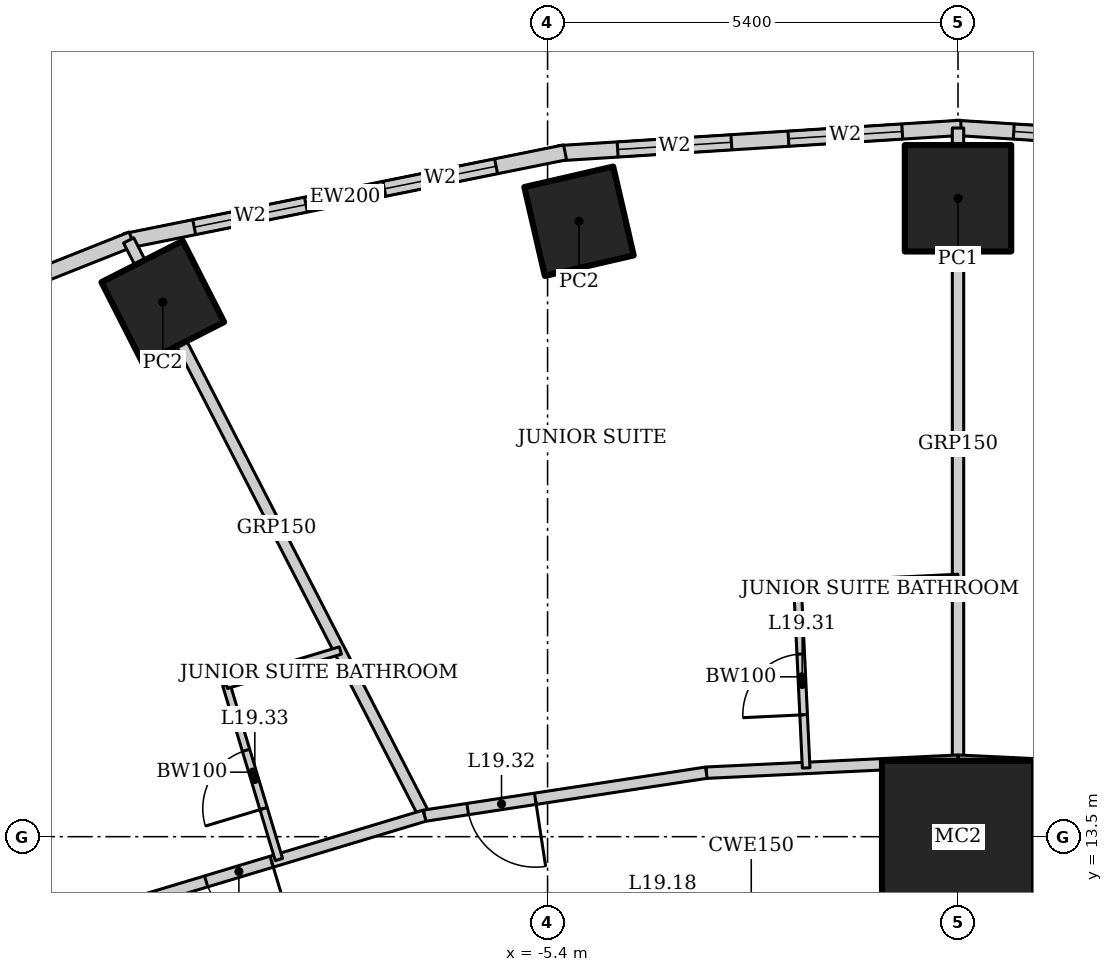
"""IFC4 building model, lengths in metres.
Left out: names, types, materials, properties, quantities, classifications, styles, units other than length and angle.
Written with IfcOpenShell. Run it as: python <this file> out.ifc"""

import sys

from ifc_helpers import new_model, si_unit, direction, frame, frame_2d, origin, origin_2d, place, context, subcontext, project, spatial, rectangle, hollow_rectangle, extrude, element, fill, save


model = new_model("IFC4")
c1 = context("Model", 3, precision=1e-05, world=origin(), true_north=direction((0.0, 1.0)))
c2 = subcontext(c1, "Body", "Model", "MODEL_VIEW")
j1 = project(units=[si_unit("LENGTHUNIT", "METRE"), si_unit("PLANEANGLEUNIT", "RADIAN")], contexts=[c1])
p1 = place(None, origin())
s1 = spatial("IfcSite", under=j1, at=p1, CompositionType="ELEMENT")
p2 = place(p1, origin())
s2 = spatial("IfcBuilding", under=s1, at=p2, CompositionType="ELEMENT")
p3 = place(p2, frame((0.0, 0.0, 83.8)))
s3 = spatial("IfcBuildingStorey", under=s2, at=p3, CompositionType="ELEMENT", Elevation=83.8)
p4 = place(p3, frame((0.0, 13.5, 0.0), z_axis=(0.0, 0.0, 1.0), x_axis=(1.0, 0.0, 0.0)))
e1 = element("IfcColumn", 1, at=p4, inside=s3, PredefinedType="COLUMN", context=c2, shape_type="SweptSolid", body=[
    extrude(hollow_rectangle(XDim=2.0, YDim=2.0, WallThickness=0.17, at=origin_2d()), origin(), (0.0, 0.0, 1.0), 3.6),
])
p5 = place(p3, frame((0.0, 21.9, 0.0), z_axis=(0.0, 0.0, 1.0), x_axis=(1.0, 0.0, 0.0)))
e2 = element("IfcColumn", 2, at=p5, inside=s3, PredefinedType="COLUMN", context=c2, shape_type="SweptSolid", body=[
    extrude(hollow_rectangle(XDim=1.4, YDim=1.4, WallThickness=0.1, at=origin_2d()), origin(), (0.0, 0.0, 1.0), 3.6),
])
for number, where, z_axis, x_axis in (
    (3, (-4.986, 21.598, 0.0), (0.0, 0.0, 1.0), (0.974, 0.225, 0.0)),
    (4, (-10.463, 20.534, 0.0), (0.0, 0.0, 1.0), (0.891, 0.454, 0.0)),
):
    element("IfcColumn", number, at=place(p3, frame(where, z_axis=z_axis, x_axis=x_axis)), inside=s3, PredefinedType="COLUMN", context=c2, shape_type="SweptSolid", body=[
        extrude(hollow_rectangle(XDim=1.2, YDim=1.2, WallThickness=0.1, at=origin_2d()), origin(), (0.0, 0.0, 1.0), 3.6),
    ])
p6 = place(p3, frame((5.253, 22.493, 0.0), z_axis=(0.0, 0.0, 1.0), x_axis=(-0.998018582375, 0.062919863585, 0.0)))
e5 = element("IfcWall", 5, at=p6, inside=s3, PredefinedType="SOLIDWALL", context=c2, shape_type="SweptSolid", body=[
    extrude(rectangle(XDim=5.304, YDim=0.2, at=frame_2d((2.652, 0.0))), origin(), (0.0, 0.0, 1.0), 3.45),
])
p7 = place(p6, frame((0.776, 0.0, 0.5)))
e6 = element("IfcOpeningElement", 6, at=p7, cuts=e5, PredefinedType="OPENING", context=c2, shape_type="SweptSolid", body=[
    extrude(rectangle(XDim=1.5, YDim=2.2, at=frame_2d((0.75, 1.1))), frame((0.0, 0.11, 0.0), z_axis=(0.0, -1.0, 0.0), x_axis=(1.0, 0.0, 0.0)), (0.0, 0.0, 1.0), 0.22),
])
p8 = place(p6, frame((3.028, 0.0, 0.5)))
e7 = element("IfcOpeningElement", 7, at=p8, cuts=e5, PredefinedType="OPENING", context=c2, shape_type="SweptSolid", body=[
    extrude(rectangle(XDim=1.5, YDim=2.2, at=frame_2d((0.75, 1.1))), frame((0.0, 0.11, 0.0), z_axis=(0.0, -1.0, 0.0), x_axis=(1.0, 0.0, 0.0)), (0.0, 0.0, 1.0), 0.22),
])
p9 = place(p3, frame((0.041, 22.827, 0.0), z_axis=(0.0, 0.0, 1.0), x_axis=(-0.998018582375, -0.062919863585, 0.0)))
e8 = element("IfcWall", 8, at=p9, inside=s3, PredefinedType="SOLIDWALL", context=c2, shape_type="SweptSolid", body=[
    extrude(rectangle(XDim=5.304, YDim=0.2, at=frame_2d((2.652, 0.0))), origin(), (0.0, 0.0, 1.0), 3.45),
])
p10 = place(p9, frame((0.776, 0.0, 0.5)))
e9 = element("IfcOpeningElement", 9, at=p10, cuts=e8, PredefinedType="OPENING", context=c2, shape_type="SweptSolid", body=[
    extrude(rectangle(XDim=1.5, YDim=2.2, at=frame_2d((0.75, 1.1))), frame((0.0, 0.11, 0.0), z_axis=(0.0, -1.0, 0.0), x_axis=(1.0, 0.0, 0.0)), (0.0, 0.0, 1.0), 0.22),
])
p11 = place(p9, frame((3.028, 0.0, 0.5)))
e10 = element("IfcOpeningElement", 10, at=p11, cuts=e8, PredefinedType="OPENING", context=c2, shape_type="SweptSolid", body=[
    extrude(rectangle(XDim=1.5, YDim=2.2, at=frame_2d((0.75, 1.1))), frame((0.0, 0.11, 0.0), z_axis=(0.0, -1.0, 0.0), x_axis=(1.0, 0.0, 0.0)), (0.0, 0.0, 1.0), 0.22),
])
p12 = place(p3, frame((-5.17, 22.504, 0.0), z_axis=(0.0, 0.0, 1.0), x_axis=(-0.980251657452, -0.197754110105, 0.0)))
e11 = element("IfcWall", 11, at=p12, inside=s3, PredefinedType="SOLIDWALL", context=c2, shape_type="SweptSolid", body=[
    extrude(rectangle(XDim=5.904, YDim=0.2, at=frame_2d((2.952, 0.0))), origin(), (0.0, 0.0, 1.0), 3.45),
])
p13 = place(p12, frame((0.926, 0.0, 0.5)))
e12 = element("IfcOpeningElement", 12, at=p13, cuts=e11, PredefinedType="OPENING", context=c2, shape_type="SweptSolid", body=[
    extrude(rectangle(XDim=1.5, YDim=2.2, at=frame_2d((0.75, 1.1))), frame((0.0, 0.11, 0.0), z_axis=(0.0, -1.0, 0.0), x_axis=(1.0, 0.0, 0.0)), (0.0, 0.0, 1.0), 0.22),
])
p14 = place(p12, frame((3.478, 0.0, 0.5)))
e13 = element("IfcOpeningElement", 13, at=p14, cuts=e11, PredefinedType="OPENING", context=c2, shape_type="SweptSolid", body=[
    extrude(rectangle(XDim=1.5, YDim=2.2, at=frame_2d((0.75, 1.1))), frame((0.0, 0.11, 0.0), z_axis=(0.0, -1.0, 0.0), x_axis=(1.0, 0.0, 0.0)), (0.0, 0.0, 1.0), 0.22),
])
p15 = place(p3, frame((-10.869, 21.363, 0.0), z_axis=(0.0, 0.0, 1.0), x_axis=(-0.929358351251, -0.369178892895, 0.0)))
e14 = element("IfcWall", 14, at=p15, inside=s3, PredefinedType="SOLIDWALL", context=c2, shape_type="SweptSolid", body=[
    extrude(rectangle(XDim=7.692, YDim=0.2, at=frame_2d((3.846, 0.0))), origin(), (0.0, 0.0, 1.0), 3.45),
])
p16 = place(p15, frame((1.373, 0.0, 0.5)))
e15 = element("IfcOpeningElement", 15, at=p16, cuts=e14, PredefinedType="OPENING", context=c2, shape_type="SweptSolid", body=[
    extrude(rectangle(XDim=1.5, YDim=2.2, at=frame_2d((0.75, 1.1))), frame((0.0, 0.11, 0.0), z_axis=(0.0, -1.0, 0.0), x_axis=(1.0, 0.0, 0.0)), (0.0, 0.0, 1.0), 0.22),
])
p17 = place(p15, frame((4.819, 0.0, 0.5)))
e16 = element("IfcOpeningElement", 16, at=p17, cuts=e14, PredefinedType="OPENING", context=c2, shape_type="SweptSolid", body=[
    extrude(rectangle(XDim=1.5, YDim=2.2, at=frame_2d((0.75, 1.1))), frame((0.0, 0.11, 0.0), z_axis=(0.0, -1.0, 0.0), x_axis=(1.0, 0.0, 0.0)), (0.0, 0.0, 1.0), 0.22),
])
p18 = place(p3, frame((0.0, 22.825, 0.0), z_axis=(0.0, 0.0, 1.0), x_axis=(0.0, -1.0, 0.0)))
e17 = element("IfcWall", 17, at=p18, inside=s3, PredefinedType="PARTITIONING", context=c2, shape_type="SweptSolid", body=[
    extrude(rectangle(XDim=8.325, YDim=0.15, at=frame_2d((4.162, 0.0))), origin(), (0.0, 0.0, 1.0), 2.924),
])
p19 = place(p3, frame((-10.912, 21.346, 0.0), z_axis=(0.0, 0.0, 1.0), x_axis=(0.457327273085, -0.889298468059, 0.0)))
e18 = element("IfcWall", 18, at=p19, inside=s3, PredefinedType="PARTITIONING", context=c2, shape_type="SweptSolid", body=[
    extrude(rectangle(XDim=8.511, YDim=0.15, at=frame_2d((4.256, 0.0))), origin(), (0.0, 0.0, 1.0), 2.528),
])
p20 = place(p3, frame((3.311, 14.342, 0.0), z_axis=(0.0, 0.0, 1.0), x_axis=(-0.998863968075, 0.047652631422, 0.0)))
e19 = element("IfcWall", 19, at=p20, inside=s3, PredefinedType="PARTITIONING", context=c2, shape_type="SweptSolid", body=[
    extrude(rectangle(XDim=3.315, YDim=0.15, at=frame_2d((1.657, 0.0))), origin(), (0.0, 0.0, 1.0), 3.45),
])
p21 = place(p20, frame((0.15, 0.0, 0.0)))
e20 = element("IfcOpeningElement", 20, at=p21, cuts=e19, PredefinedType="OPENING", context=c2, shape_type="SweptSolid", body=[
    extrude(rectangle(XDim=0.9, YDim=2.1, at=frame_2d((0.45, 1.05))), frame((0.0, 0.085, 0.0), z_axis=(0.0, -1.0, 0.0), x_axis=(1.0, 0.0, 0.0)), (0.0, 0.0, 1.0), 0.17),
])
p22 = place(p3, frame((0.0, 14.5, 0.0), z_axis=(0.0, 0.0, 1.0), x_axis=(-0.998863968075, -0.047652631422, 0.0)))
e21 = element("IfcWall", 21, at=p22, inside=s3, PredefinedType="PARTITIONING", context=c2, shape_type="SweptSolid", body=[
    extrude(rectangle(XDim=3.315, YDim=0.15, at=frame_2d((1.657, 0.0))), origin(), (0.0, 0.0, 1.0), 3.45),
])
p23 = place(p3, frame((-3.311, 14.342, 0.0), z_axis=(0.0, 0.0, 1.0), x_axis=(-0.988564270062, -0.150800145746, 0.0)))
e22 = element("IfcWall", 22, at=p23, inside=s3, PredefinedType="PARTITIONING", context=c2, shape_type="SweptSolid", body=[
    extrude(rectangle(XDim=3.751, YDim=0.15, at=frame_2d((1.875, 0.0))), origin(), (0.0, 0.0, 1.0), 3.45),
])
p24 = place(p23, frame((2.276, 0.0, 0.0)))
e23 = element("IfcOpeningElement", 23, at=p24, cuts=e22, PredefinedType="OPENING", context=c2, shape_type="SweptSolid", body=[
    extrude(rectangle(XDim=0.9, YDim=2.1, at=frame_2d((0.45, 1.05))), frame((0.0, 0.085, 0.0), z_axis=(0.0, -1.0, 0.0), x_axis=(1.0, 0.0, 0.0)), (0.0, 0.0, 1.0), 0.17),
])
p25 = place(p3, frame((-7.019, 13.776, 0.0), z_axis=(0.0, 0.0, 1.0), x_axis=(-0.957564241242, -0.288219922793, 0.0)))
e24 = element("IfcWall", 24, at=p25, inside=s3, PredefinedType="PARTITIONING", context=c2, shape_type="SweptSolid", body=[
    extrude(rectangle(XDim=5.085, YDim=0.15, at=frame_2d((2.542, 0.0))), origin(), (0.0, 0.0, 1.0), 3.45),
])
p26 = place(p25, frame((2.1, 0.0, 0.0)))
e25 = element("IfcOpeningElement", 25, at=p26, cuts=e24, PredefinedType="OPENING", context=c2, shape_type="SweptSolid", body=[
    extrude(rectangle(XDim=0.9, YDim=2.1, at=frame_2d((0.45, 1.05))), frame((0.0, 0.085, 0.0), z_axis=(0.0, -1.0, 0.0), x_axis=(1.0, 0.0, 0.0)), (0.0, 0.0, 1.0), 0.17),
])
p27 = place(p3, frame((-1.998, 14.405, 0.0), z_axis=(0.0, 0.0, 1.0), x_axis=(-0.047608648396, 0.998866065395, 0.0)))
e26 = element("IfcWall", 26, at=p27, inside=s3, PredefinedType="PARTITIONING", context=c2, shape_type="SweptSolid", body=[
    extrude(rectangle(XDim=2.4, YDim=0.1, at=frame_2d((1.2, 0.0))), origin(), (0.0, 0.0, 1.0), 2.749),
])
p28 = place(p27, frame((0.7, 0.0, 0.0)))
e27 = element("IfcOpeningElement", 27, at=p28, cuts=e26, PredefinedType="OPENING", context=c2, shape_type="SweptSolid", body=[
    extrude(rectangle(XDim=0.8, YDim=2.1, at=frame_2d((0.4, 1.05))), frame((0.0, 0.06, 0.0), z_axis=(0.0, -1.0, 0.0), x_axis=(1.0, 0.0, 0.0)), (0.0, 0.0, 1.0), 0.12),
])
p29 = place(p3, frame((-2.112, 16.802, 0.0), z_axis=(0.0, 0.0, 1.0), x_axis=(0.998862383453, 0.047685835668, 0.0)))
e28 = element("IfcWall", 28, at=p29, inside=s3, PredefinedType="PARTITIONING", context=c2, shape_type="SweptSolid", body=[
    extrude(rectangle(XDim=2.115, YDim=0.1, at=frame_2d((1.057, 0.0))), origin(), (0.0, 0.0, 1.0), 3.45),
])
p30 = place(p3, frame((-8.935, 13.2, 0.0), z_axis=(0.0, 0.0, 1.0), x_axis=(-0.288197066254, 0.957571120598, 0.0)))
e29 = element("IfcWall", 29, at=p30, inside=s3, PredefinedType="PARTITIONING", context=c2, shape_type="SweptSolid", body=[
    extrude(rectangle(XDim=2.4, YDim=0.1, at=frame_2d((1.2, 0.0))), origin(), (0.0, 0.0, 1.0), 3.45),
])
p31 = place(p30, frame((0.7, 0.0, 0.0)))
e30 = element("IfcOpeningElement", 30, at=p31, cuts=e29, PredefinedType="OPENING", context=c2, shape_type="SweptSolid", body=[
    extrude(rectangle(XDim=0.8, YDim=2.1, at=frame_2d((0.4, 1.05))), frame((0.0, 0.06, 0.0), z_axis=(0.0, -1.0, 0.0), x_axis=(1.0, 0.0, 0.0)), (0.0, 0.0, 1.0), 0.12),
])
p32 = place(p3, frame((-9.626, 15.498, 0.0), z_axis=(0.0, 0.0, 1.0), x_axis=(0.957551231109, 0.288263143328, 0.0)))
e31 = element("IfcWall", 31, at=p32, inside=s3, PredefinedType="PARTITIONING", context=c2, shape_type="SweptSolid", body=[
    extrude(rectangle(XDim=1.566, YDim=0.1, at=frame_2d((0.783, 0.0))), origin(), (0.0, 0.0, 1.0), 3.45),
])
p33 = place(p8, origin())
e32 = element("IfcWindow", 32, at=p33, inside=s3, PartitioningType="SINGLE_PANEL", PredefinedType="WINDOW", context=c2, shape_type="SweptSolid", body=[
    extrude(rectangle(XDim=1.5, YDim=2.2, at=frame_2d((0.75, 1.1))), frame((0.0, 0.03, 0.0), z_axis=(0.0, -1.0, 0.0), x_axis=(1.0, 0.0, 0.0)), (0.0, 0.0, 1.0), 0.06),
])
fill(e7, e32)
p34 = place(p10, origin())
e33 = element("IfcWindow", 33, at=p34, inside=s3, PartitioningType="SINGLE_PANEL", PredefinedType="WINDOW", context=c2, shape_type="SweptSolid", body=[
    extrude(rectangle(XDim=1.5, YDim=2.2, at=frame_2d((0.75, 1.1))), frame((0.0, 0.03, 0.0), z_axis=(0.0, -1.0, 0.0), x_axis=(1.0, 0.0, 0.0)), (0.0, 0.0, 1.0), 0.06),
])
fill(e9, e33)
p35 = place(p11, origin())
e34 = element("IfcWindow", 34, at=p35, inside=s3, PartitioningType="SINGLE_PANEL", PredefinedType="WINDOW", context=c2, shape_type="SweptSolid", body=[
    extrude(rectangle(XDim=1.5, YDim=2.2, at=frame_2d((0.75, 1.1))), frame((0.0, 0.03, 0.0), z_axis=(0.0, -1.0, 0.0), x_axis=(1.0, 0.0, 0.0)), (0.0, 0.0, 1.0), 0.06),
])
fill(e10, e34)
p36 = place(p13, origin())
e35 = element("IfcWindow", 35, at=p36, inside=s3, PartitioningType="SINGLE_PANEL", PredefinedType="WINDOW", context=c2, shape_type="SweptSolid", body=[
    extrude(rectangle(XDim=1.5, YDim=2.2, at=frame_2d((0.75, 1.1))), frame((0.0, 0.03, 0.0), z_axis=(0.0, -1.0, 0.0), x_axis=(1.0, 0.0, 0.0)), (0.0, 0.0, 1.0), 0.06),
])
fill(e12, e35)
p37 = place(p14, origin())
e36 = element("IfcWindow", 36, at=p37, inside=s3, PartitioningType="SINGLE_PANEL", PredefinedType="WINDOW", context=c2, shape_type="SweptSolid", body=[
    extrude(rectangle(XDim=1.5, YDim=2.2, at=frame_2d((0.75, 1.1))), frame((0.0, 0.03, 0.0), z_axis=(0.0, -1.0, 0.0), x_axis=(1.0, 0.0, 0.0)), (0.0, 0.0, 1.0), 0.06),
])
fill(e13, e36)
p38 = place(p28, origin())
e37 = element("IfcDoor", 37, at=p38, inside=s3, OperationType="SINGLE_SWING_LEFT", PredefinedType="DOOR", context=c2, shape_type="SweptSolid", body=[
    extrude(rectangle(XDim=0.8, YDim=2.1, at=frame_2d((0.4, 1.05))), frame((0.0, 0.025, 0.0), z_axis=(0.0, -1.0, 0.0), x_axis=(1.0, 0.0, 0.0)), (0.0, 0.0, 1.0), 0.05),
])
fill(e27, e37)
p39 = place(p24, origin())
e38 = element("IfcDoor", 38, at=p39, inside=s3, OperationType="SINGLE_SWING_LEFT", PredefinedType="DOOR", context=c2, shape_type="SweptSolid", body=[
    extrude(rectangle(XDim=0.9, YDim=2.1, at=frame_2d((0.45, 1.05))), frame((0.0, 0.025, 0.0), z_axis=(0.0, -1.0, 0.0), x_axis=(1.0, 0.0, 0.0)), (0.0, 0.0, 1.0), 0.05),
])
fill(e23, e38)
p40 = place(p31, origin())
e39 = element("IfcDoor", 39, at=p40, inside=s3, OperationType="SINGLE_SWING_LEFT", PredefinedType="DOOR", context=c2, shape_type="SweptSolid", body=[
    extrude(rectangle(XDim=0.8, YDim=2.1, at=frame_2d((0.4, 1.05))), frame((0.0, 0.025, 0.0), z_axis=(0.0, -1.0, 0.0), x_axis=(1.0, 0.0, 0.0)), (0.0, 0.0, 1.0), 0.05),
])
fill(e30, e39)
p41 = place(p26, origin())
e40 = element("IfcDoor", 40, at=p41, inside=s3, OperationType="SINGLE_SWING_LEFT", PredefinedType="DOOR", context=c2, shape_type="SweptSolid", body=[
    extrude(rectangle(XDim=0.9, YDim=2.1, at=frame_2d((0.45, 1.05))), frame((0.0, 0.025, 0.0), z_axis=(0.0, -1.0, 0.0), x_axis=(1.0, 0.0, 0.0)), (0.0, 0.0, 1.0), 0.05),
])
fill(e25, e40)
save(model, sys.argv[1])
